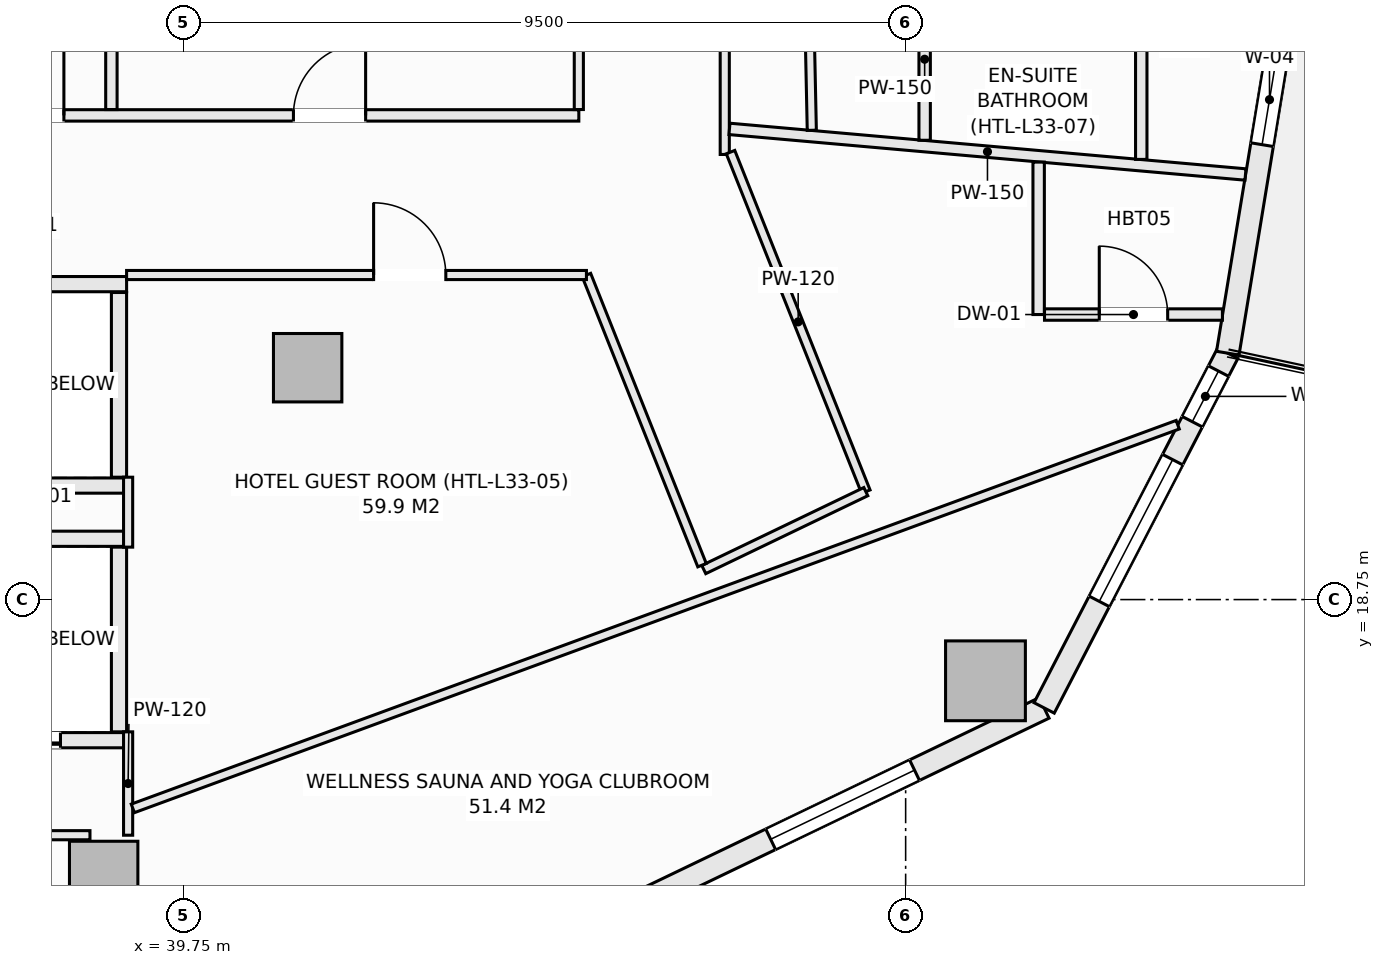
"""IFC4 building model, lengths in metres.
Left out: names, types, materials, properties, quantities, classifications, styles, units other than length and angle.
Written with IfcOpenShell. Run it as: python <this file> out.ifc"""

import sys

from ifc_helpers import new_model, si_unit, direction, frame, frame_2d, origin, origin_2d, place, context, subcontext, project, spatial, rectangle, extrude, element, fill, save


model = new_model("IFC4")
c1 = context("Model", 3, precision=1e-05, world=origin(), true_north=direction((0.0, 1.0)))
c2 = subcontext(c1, "Body", "Model", "MODEL_VIEW")
j1 = project(units=[si_unit("LENGTHUNIT", "METRE"), si_unit("PLANEANGLEUNIT", "RADIAN")], contexts=[c1])
p1 = place(None, origin())
s1 = spatial("IfcSite", under=j1, at=p1, CompositionType="ELEMENT")
p2 = place(p1, origin())
s2 = spatial("IfcBuilding", under=s1, at=p2, CompositionType="ELEMENT")
p3 = place(p2, frame((0.0, 0.0, 132.5)))
s3 = spatial("IfcBuildingStorey", under=s2, at=p3, CompositionType="ELEMENT", Elevation=132.5)
p4 = place(p3, frame((50.3, 17.681, -0.27), z_axis=(0.0, 0.0, 1.0), x_axis=(1.0, 0.0, 0.0)))
e1 = element("IfcColumn", 1, at=p4, inside=s3, PredefinedType="COLUMN", context=c2, shape_type="SweptSolid", body=[
    extrude(rectangle(XDim=1.05, YDim=1.05, at=origin_2d()), origin(), (0.0, 0.0, 1.0), 3.4),
])
for number, where, z_axis, x_axis in (
    (2, (38.698, 15.121, -0.27), (0.0, 0.0, 1.0), (1.0, 0.0, 0.0)),
    (3, (41.382, 21.801, -0.27), (0.0, 0.0, 1.0), (1.0, 0.0, 0.0)),
):
    element("IfcColumn", number, at=place(p3, frame(where, z_axis=z_axis, x_axis=x_axis)), inside=s3, PredefinedType="COLUMN", context=c2, shape_type="SweptSolid", body=[
        extrude(rectangle(XDim=0.9, YDim=0.9, at=origin_2d()), origin(), (0.0, 0.0, 1.0), 3.4),
    ])
p5 = place(p3, frame((45.769, 14.777, 0.0), z_axis=(0.0, 0.0, 1.0), x_axis=(0.901370184739, 0.433049408339, 0.0)))
e4 = element("IfcWall", 4, at=p5, inside=s3, PredefinedType="SOLIDWALL", context=c2, shape_type="SweptSolid", body=[
    extrude(rectangle(XDim=5.884, YDim=0.3, at=frame_2d((2.942, 0.0))), origin(), (0.0, 0.0, 1.0), 2.653),
])
p6 = place(p5, frame((1.892, 0.0, 0.74)))
e5 = element("IfcOpeningElement", 5, at=p6, cuts=e4, PredefinedType="OPENING", context=c2, shape_type="SweptSolid", body=[
    extrude(rectangle(XDim=2.1, YDim=1.7, at=frame_2d((1.05, 0.85))), frame((0.0, 0.16, 0.0), z_axis=(0.0, -1.0, 0.0), x_axis=(1.0, 0.0, 0.0)), (0.0, 0.0, 1.0), 0.32),
])
p7 = place(p3, frame((51.072, 17.325, 0.0), z_axis=(0.0, 0.0, 1.0), x_axis=(0.459767899643, 0.888039119892, 0.0)))
e6 = element("IfcWall", 6, at=p7, inside=s3, PredefinedType="SOLIDWALL", context=c2, shape_type="SweptSolid", body=[
    extrude(rectangle(XDim=5.255, YDim=0.3, at=frame_2d((2.628, 0.0))), origin(), (0.0, 0.0, 1.0), 2.653),
])
p8 = place(p7, frame((1.578, 0.0, 0.74)))
e7 = element("IfcOpeningElement", 7, at=p8, cuts=e6, PredefinedType="OPENING", context=c2, shape_type="SweptSolid", body=[
    extrude(rectangle(XDim=2.1, YDim=1.7, at=frame_2d((1.05, 0.85))), frame((0.0, 0.16, 0.0), z_axis=(0.0, -1.0, 0.0), x_axis=(1.0, 0.0, 0.0)), (0.0, 0.0, 1.0), 0.32),
])
p9 = place(p7, frame((4.24, 0.0, 0.72)))
e8 = element("IfcOpeningElement", 8, at=p9, cuts=e6, PredefinedType="OPENING", context=c2, shape_type="SweptSolid", body=[
    extrude(rectangle(XDim=0.75, YDim=1.65, at=frame_2d((0.375, 0.825))), frame((0.0, 0.16, 0.0), z_axis=(0.0, -1.0, 0.0), x_axis=(1.0, 0.0, 0.0)), (0.0, 0.0, 1.0), 0.32),
])
p10 = place(p3, frame((53.488, 21.992, 0.0), z_axis=(0.0, 0.0, 1.0), x_axis=(0.162393944769, 0.986726003864, 0.0)))
e9 = element("IfcWall", 9, at=p10, inside=s3, PredefinedType="SOLIDWALL", context=c2, shape_type="SweptSolid", body=[
    extrude(rectangle(XDim=5.075, YDim=0.3, at=frame_2d((2.538, 0.0))), origin(), (0.0, 0.0, 1.0), 2.653),
])
p11 = place(p10, frame((2.78, 0.0, 0.72)))
e10 = element("IfcOpeningElement", 10, at=p11, cuts=e9, PredefinedType="OPENING", context=c2, shape_type="SweptSolid", body=[
    extrude(rectangle(XDim=1.2, YDim=1.65, at=frame_2d((0.6, 0.825))), frame((0.0, 0.16, 0.0), z_axis=(0.0, -1.0, 0.0), x_axis=(1.0, 0.0, 0.0)), (0.0, 0.0, 1.0), 0.32),
])
p12 = place(p3, frame((36.75, 19.55, 0.0), z_axis=(0.0, 0.0, 1.0), x_axis=(1.0, 0.0, 0.0)))
e11 = element("IfcWall", 11, at=p12, inside=s3, PredefinedType="SOLIDWALL", context=c2, shape_type="SweptSolid", body=[
    extrude(rectangle(XDim=2.25, YDim=0.2, at=frame_2d((1.125, 0.0))), origin(), (0.0, 0.0, 1.0), 3.13),
])
p13 = place(p3, frame((36.75, 16.9, 0.0), z_axis=(0.0, 0.0, 1.0), x_axis=(1.0, 0.0, 0.0)))
e12 = element("IfcWall", 12, at=p13, inside=s3, PredefinedType="SOLIDWALL", context=c2, shape_type="SweptSolid", body=[
    extrude(rectangle(XDim=2.25, YDim=0.2, at=frame_2d((1.125, 0.0))), origin(), (0.0, 0.0, 1.0), 3.13),
])
p14 = place(p13, frame((0.28, 0.0, 0.0)))
e13 = element("IfcOpeningElement", 13, at=p14, cuts=e12, PredefinedType="OPENING", context=c2, shape_type="SweptSolid", body=[
    extrude(rectangle(XDim=1.1, YDim=2.2, at=frame_2d((0.55, 1.1))), frame((0.0, 0.11, 0.0), z_axis=(0.0, -1.0, 0.0), x_axis=(1.0, 0.0, 0.0)), (0.0, 0.0, 1.0), 0.22),
])
p15 = place(p3, frame((38.9, 17.01, 0.0), z_axis=(0.0, 0.0, 1.0), x_axis=(0.0, 1.0, 0.0)))
e14 = element("IfcWall", 14, at=p15, inside=s3, PredefinedType="SOLIDWALL", context=c2, shape_type="SweptSolid", body=[
    extrude(rectangle(XDim=2.43, YDim=0.2, at=frame_2d((1.215, 0.0))), origin(), (0.0, 0.0, 1.0), 3.13),
])
for number, where, z_axis, x_axis in (
    (15, (36.75, 22.9, 0.0), (0.0, 0.0, 1.0), (1.0, 0.0, 0.0)),
    (16, (36.75, 20.25, 0.0), (0.0, 0.0, 1.0), (1.0, 0.0, 0.0)),
):
    element("IfcWall", number, at=place(p3, frame(where, z_axis=z_axis, x_axis=x_axis)), inside=s3, PredefinedType="SOLIDWALL", context=c2, shape_type="SweptSolid", body=[
        extrude(rectangle(XDim=2.25, YDim=0.2, at=frame_2d((1.125, 0.0))), origin(), (0.0, 0.0, 1.0), 3.13),
    ])
p16 = place(p3, frame((38.9, 20.36, 0.0), z_axis=(0.0, 0.0, 1.0), x_axis=(0.0, 1.0, 0.0)))
e17 = element("IfcWall", 17, at=p16, inside=s3, PredefinedType="SOLIDWALL", context=c2, shape_type="SweptSolid", body=[
    extrude(rectangle(XDim=2.43, YDim=0.2, at=frame_2d((1.215, 0.0))), origin(), (0.0, 0.0, 1.0), 3.13),
])
p17 = place(p3, frame((29.78, 25.12, 0.0), z_axis=(0.0, 0.0, 1.0), x_axis=(1.0, 0.0, 0.0)))
e18 = element("IfcWall", 18, at=p17, inside=s3, PredefinedType="PARTITIONING", context=c2, shape_type="SweptSolid", body=[
    extrude(rectangle(XDim=15.17, YDim=0.15, at=frame_2d((7.585, 0.0))), origin(), (0.0, 0.0, 1.0), 3.13),
])
p18 = place(p17, frame((3.14, 0.0, 0.0)))
e19 = element("IfcOpeningElement", 19, at=p18, cuts=e18, PredefinedType="OPENING", context=c2, shape_type="SweptSolid", body=[
    extrude(rectangle(XDim=0.95, YDim=2.1, at=frame_2d((0.475, 1.05))), frame((0.0, 0.085, 0.0), z_axis=(0.0, -1.0, 0.0), x_axis=(1.0, 0.0, 0.0)), (0.0, 0.0, 1.0), 0.17),
])
p19 = place(p17, frame((7.445, 0.0, 0.0)))
e20 = element("IfcOpeningElement", 20, at=p19, cuts=e18, PredefinedType="OPENING", context=c2, shape_type="SweptSolid", body=[
    extrude(rectangle(XDim=0.95, YDim=2.1, at=frame_2d((0.475, 1.05))), frame((0.0, 0.085, 0.0), z_axis=(0.0, -1.0, 0.0), x_axis=(1.0, 0.0, 0.0)), (0.0, 0.0, 1.0), 0.17),
])
p20 = place(p17, frame((11.415, 0.0, 0.0)))
e21 = element("IfcOpeningElement", 21, at=p20, cuts=e18, PredefinedType="OPENING", context=c2, shape_type="SweptSolid", body=[
    extrude(rectangle(XDim=0.95, YDim=2.1, at=frame_2d((0.475, 1.05))), frame((0.0, 0.085, 0.0), z_axis=(0.0, -1.0, 0.0), x_axis=(1.0, 0.0, 0.0)), (0.0, 0.0, 1.0), 0.17),
])
p21 = place(p3, frame((38.8, 25.197, 0.0), z_axis=(0.0, 0.0, 1.0), x_axis=(0.0, 1.0, 0.0)))
e22 = element("IfcWall", 22, at=p21, inside=s3, PredefinedType="PARTITIONING", context=c2, shape_type="SweptSolid", body=[
    extrude(rectangle(XDim=3.646, YDim=0.15, at=frame_2d((1.823, 0.0))), origin(), (0.0, 0.0, 1.0), 3.13),
])
p22 = place(p3, frame((39.02, 15.65, 0.0), z_axis=(0.0, 0.0, 1.0), x_axis=(0.0, 1.0, 0.0)))
e23 = element("IfcWall", 23, at=p22, inside=s3, PredefinedType="PARTITIONING", context=c2, shape_type="SweptSolid", body=[
    extrude(rectangle(XDim=1.36, YDim=0.12, at=frame_2d((0.68, 0.0))), origin(), (0.0, 0.0, 1.0), 2.505),
])
p23 = place(p3, frame((39.02, 19.44, 0.0), z_axis=(0.0, 0.0, 1.0), x_axis=(0.0, 1.0, 0.0)))
e24 = element("IfcWall", 24, at=p23, inside=s3, PredefinedType="PARTITIONING", context=c2, shape_type="SweptSolid", body=[
    extrude(rectangle(XDim=0.92, YDim=0.12, at=frame_2d((0.46, 0.0))), origin(), (0.0, 0.0, 1.0), 3.13),
])
p24 = place(p3, frame((35.95, 15.65, 0.0), z_axis=(0.0, 0.0, 1.0), x_axis=(1.0, 0.0, 0.0)))
e25 = element("IfcWall", 25, at=p24, inside=s3, PredefinedType="PARTITIONING", context=c2, shape_type="SweptSolid", body=[
    extrude(rectangle(XDim=2.568, YDim=0.12, at=frame_2d((1.284, 0.0))), origin(), (0.0, 0.0, 1.0), 3.13),
])
p25 = place(p3, frame((46.87, 24.606, 0.0), z_axis=(0.0, 0.0, 1.0), x_axis=(0.0, 1.0, 0.0)))
e26 = element("IfcWall", 26, at=p25, inside=s3, PredefinedType="PARTITIONING", context=c2, shape_type="SweptSolid", body=[
    extrude(rectangle(XDim=4.788, YDim=0.12, at=frame_2d((2.394, 0.0))), origin(), (0.0, 0.0, 1.0), 3.13),
])
p26 = place(p3, frame((46.946, 24.637, 0.0), z_axis=(0.0, 0.0, 1.0), x_axis=(0.370173596818, -0.928962597858, 0.0)))
e27 = element("IfcWall", 27, at=p26, inside=s3, PredefinedType="PARTITIONING", context=c2, shape_type="SweptSolid", body=[
    extrude(rectangle(XDim=4.809, YDim=0.12, at=frame_2d((2.404, 0.0))), origin(), (0.0, 0.0, 1.0), 3.13),
])
p27 = place(p3, frame((46.594, 19.145, 0.0), z_axis=(0.0, 0.0, 1.0), x_axis=(0.901274899261, 0.433247684312, 0.0)))
e28 = element("IfcWall", 28, at=p27, inside=s3, PredefinedType="PARTITIONING", context=c2, shape_type="SweptSolid", body=[
    extrude(rectangle(XDim=2.366, YDim=0.12, at=frame_2d((1.183, 0.0))), origin(), (0.0, 0.0, 1.0), 3.13),
])
p28 = place(p3, frame((45.05, 23.02, 0.0), z_axis=(0.0, 0.0, 1.0), x_axis=(0.370140626192, -0.928975735335, 0.0)))
e29 = element("IfcWall", 29, at=p28, inside=s3, PredefinedType="PARTITIONING", context=c2, shape_type="SweptSolid", body=[
    extrude(rectangle(XDim=4.109, YDim=0.12, at=frame_2d((2.055, 0.0))), origin(), (0.0, 0.0, 1.0), 3.13),
])
p29 = place(p3, frame((39.0, 23.02, 0.0), z_axis=(0.0, 0.0, 1.0), x_axis=(1.0, 0.0, 0.0)))
e30 = element("IfcWall", 30, at=p29, inside=s3, PredefinedType="PARTITIONING", context=c2, shape_type="SweptSolid", body=[
    extrude(rectangle(XDim=6.05, YDim=0.12, at=frame_2d((3.025, 0.0))), origin(), (0.0, 0.0, 1.0), 3.13),
])
p30 = place(p29, frame((3.25, 0.0, 0.0)))
e31 = element("IfcOpeningElement", 31, at=p30, cuts=e30, PredefinedType="OPENING", context=c2, shape_type="SweptSolid", body=[
    extrude(rectangle(XDim=0.95, YDim=2.1, at=frame_2d((0.475, 1.05))), frame((0.0, 0.07, 0.0), z_axis=(0.0, -1.0, 0.0), x_axis=(1.0, 0.0, 0.0)), (0.0, 0.0, 1.0), 0.14),
])
p31 = place(p3, frame((44.95, 25.197, 0.0), z_axis=(0.0, 0.0, 1.0), x_axis=(0.0, 1.0, 0.0)))
e32 = element("IfcWall", 32, at=p31, inside=s3, PredefinedType="PARTITIONING", context=c2, shape_type="SweptSolid", body=[
    extrude(rectangle(XDim=3.646, YDim=0.12, at=frame_2d((1.823, 0.0))), origin(), (0.0, 0.0, 1.0), 3.13),
])
p32 = place(p3, frame((46.932, 24.942, 0.0), z_axis=(0.0, 0.0, 1.0), x_axis=(0.996119604576, -0.088009848195, 0.0)))
e33 = element("IfcWall", 33, at=p32, inside=s3, PredefinedType="PARTITIONING", context=c2, shape_type="SweptSolid", body=[
    extrude(rectangle(XDim=6.816, YDim=0.15, at=frame_2d((3.408, 0.0))), origin(), (0.0, 0.0, 1.0), 3.13),
])
p33 = place(p3, frame((39.082, 16.003, 0.0), z_axis=(0.0, 0.0, 1.0), x_axis=(0.93872535699, 0.344666076288, 0.0)))
e34 = element("IfcWall", 34, at=p33, inside=s3, PredefinedType="PARTITIONING", context=c2, shape_type="SweptSolid", body=[
    extrude(rectangle(XDim=14.645, YDim=0.12, at=frame_2d((7.323, 0.0))), origin(), (0.0, 0.0, 1.0), 3.13),
])
p34 = place(p3, frame((51.0, 22.5, 0.0), z_axis=(0.0, 0.0, 1.0), x_axis=(0.0, 1.0, 0.0)))
e35 = element("IfcWall", 35, at=p34, inside=s3, PredefinedType="PARTITIONING", context=c2, shape_type="SweptSolid", body=[
    extrude(rectangle(XDim=2.006, YDim=0.15, at=frame_2d((1.003, 0.0))), origin(), (0.0, 0.0, 1.0), 3.13),
])
p35 = place(p3, frame((51.077, 22.5, 0.0), z_axis=(0.0, 0.0, 1.0), x_axis=(1.0, 0.0, 0.0)))
e36 = element("IfcWall", 36, at=p35, inside=s3, PredefinedType="PARTITIONING", context=c2, shape_type="SweptSolid", body=[
    extrude(rectangle(XDim=2.341, YDim=0.15, at=frame_2d((1.17, 0.0))), origin(), (0.0, 0.0, 1.0), 2.812),
])
p36 = place(p35, frame((0.72, 0.0, 0.0)))
e37 = element("IfcOpeningElement", 37, at=p36, cuts=e36, PredefinedType="OPENING", context=c2, shape_type="SweptSolid", body=[
    extrude(rectangle(XDim=0.9, YDim=2.1, at=frame_2d((0.45, 1.05))), frame((0.0, 0.085, 0.0), z_axis=(0.0, -1.0, 0.0), x_axis=(1.0, 0.0, 0.0)), (0.0, 0.0, 1.0), 0.17),
])
p37 = place(p3, frame((52.35, 24.541, 0.0), z_axis=(0.0, 0.0, 1.0), x_axis=(0.0, 1.0, 0.0)))
e38 = element("IfcWall", 38, at=p37, inside=s3, PredefinedType="PARTITIONING", context=c2, shape_type="SweptSolid", body=[
    extrude(rectangle(XDim=2.461, YDim=0.15, at=frame_2d((1.23, 0.0))), origin(), (0.0, 0.0, 1.0), 3.13),
])
p38 = place(p3, frame((49.5, 24.793, 0.0), z_axis=(0.0, 0.0, 1.0), x_axis=(0.0, 1.0, 0.0)))
e39 = element("IfcWall", 39, at=p38, inside=s3, PredefinedType="PARTITIONING", context=c2, shape_type="SweptSolid", body=[
    extrude(rectangle(XDim=2.132, YDim=0.15, at=frame_2d((1.066, 0.0))), origin(), (0.0, 0.0, 1.0), 3.13),
])
p39 = place(p3, frame((47.876, 31.53, 0.0), z_axis=(0.0, 0.0, 1.0), x_axis=(0.021060407881, -0.999778205013, 0.0)))
e40 = element("IfcWall", 40, at=p39, inside=s3, PredefinedType="PARTITIONING", context=c2, shape_type="SweptSolid", body=[
    extrude(rectangle(XDim=6.608, YDim=0.12, at=frame_2d((3.304, 0.0))), origin(), (0.0, 0.0, 1.0), 3.13),
])
p40 = place(p6, origin())
e41 = element("IfcWindow", 41, at=p40, inside=s3, PartitioningType="SINGLE_PANEL", PredefinedType="WINDOW", context=c2, shape_type="SweptSolid", body=[
    extrude(rectangle(XDim=2.1, YDim=1.7, at=frame_2d((1.05, 0.85))), frame((0.0, 0.03, 0.0), z_axis=(0.0, -1.0, 0.0), x_axis=(1.0, 0.0, 0.0)), (0.0, 0.0, 1.0), 0.06),
])
fill(e5, e41)
p41 = place(p8, origin())
e42 = element("IfcWindow", 42, at=p41, inside=s3, PartitioningType="SINGLE_PANEL", PredefinedType="WINDOW", context=c2, shape_type="SweptSolid", body=[
    extrude(rectangle(XDim=2.1, YDim=1.7, at=frame_2d((1.05, 0.85))), frame((0.0, 0.03, 0.0), z_axis=(0.0, -1.0, 0.0), x_axis=(1.0, 0.0, 0.0)), (0.0, 0.0, 1.0), 0.06),
])
fill(e7, e42)
p42 = place(p11, origin())
e43 = element("IfcWindow", 43, at=p42, inside=s3, PartitioningType="SINGLE_PANEL", PredefinedType="WINDOW", context=c2, shape_type="SweptSolid", body=[
    extrude(rectangle(XDim=1.2, YDim=1.65, at=frame_2d((0.6, 0.825))), frame((0.0, 0.03, 0.0), z_axis=(0.0, -1.0, 0.0), x_axis=(1.0, 0.0, 0.0)), (0.0, 0.0, 1.0), 0.06),
])
fill(e10, e43)
p43 = place(p14, origin())
e44 = element("IfcDoor", 44, at=p43, inside=s3, OperationType="SLIDING_TO_LEFT", PredefinedType="DOOR", context=c2, shape_type="SweptSolid", body=[
    extrude(rectangle(XDim=1.1, YDim=2.2, at=frame_2d((0.55, 1.1))), frame((0.0, 0.025, 0.0), z_axis=(0.0, -1.0, 0.0), x_axis=(1.0, 0.0, 0.0)), (0.0, 0.0, 1.0), 0.05),
])
fill(e13, e44)
p44 = place(p19, origin())
e45 = element("IfcDoor", 45, at=p44, inside=s3, OperationType="SINGLE_SWING_RIGHT", PredefinedType="DOOR", context=c2, shape_type="SweptSolid", body=[
    extrude(rectangle(XDim=0.95, YDim=2.1, at=frame_2d((0.475, 1.05))), frame((0.0, 0.025, 0.0), z_axis=(0.0, -1.0, 0.0), x_axis=(1.0, 0.0, 0.0)), (0.0, 0.0, 1.0), 0.05),
])
fill(e20, e45)
p45 = place(p30, origin())
e46 = element("IfcDoor", 46, at=p45, inside=s3, OperationType="SINGLE_SWING_LEFT", PredefinedType="DOOR", context=c2, shape_type="SweptSolid", body=[
    extrude(rectangle(XDim=0.95, YDim=2.1, at=frame_2d((0.475, 1.05))), frame((0.0, 0.025, 0.0), z_axis=(0.0, -1.0, 0.0), x_axis=(1.0, 0.0, 0.0)), (0.0, 0.0, 1.0), 0.05),
])
fill(e31, e46)
p46 = place(p20, origin())
e47 = element("IfcDoor", 47, at=p46, inside=s3, OperationType="SINGLE_SWING_RIGHT", PredefinedType="DOOR", context=c2, shape_type="SweptSolid", body=[
    extrude(rectangle(XDim=0.95, YDim=2.1, at=frame_2d((0.475, 1.05))), frame((0.0, 0.025, 0.0), z_axis=(0.0, -1.0, 0.0), x_axis=(1.0, 0.0, 0.0)), (0.0, 0.0, 1.0), 0.05),
])
fill(e21, e47)
p47 = place(p36, origin())
e48 = element("IfcDoor", 48, at=p47, inside=s3, OperationType="SINGLE_SWING_LEFT", PredefinedType="DOOR", context=c2, shape_type="SweptSolid", body=[
    extrude(rectangle(XDim=0.9, YDim=2.1, at=frame_2d((0.45, 1.05))), frame((0.0, 0.025, 0.0), z_axis=(0.0, -1.0, 0.0), x_axis=(1.0, 0.0, 0.0)), (0.0, 0.0, 1.0), 0.05),
])
fill(e37, e48)
p48 = place(p9, origin())
e49 = element("IfcWindow", 49, at=p48, inside=s3, PartitioningType="SINGLE_PANEL", PredefinedType="WINDOW", context=c2, shape_type="SweptSolid", body=[
    extrude(rectangle(XDim=0.75, YDim=1.65, at=frame_2d((0.375, 0.825))), frame((0.0, 0.03, 0.0), z_axis=(0.0, -1.0, 0.0), x_axis=(1.0, 0.0, 0.0)), (0.0, 0.0, 1.0), 0.06),
])
fill(e8, e49)
save(model, sys.argv[1])
